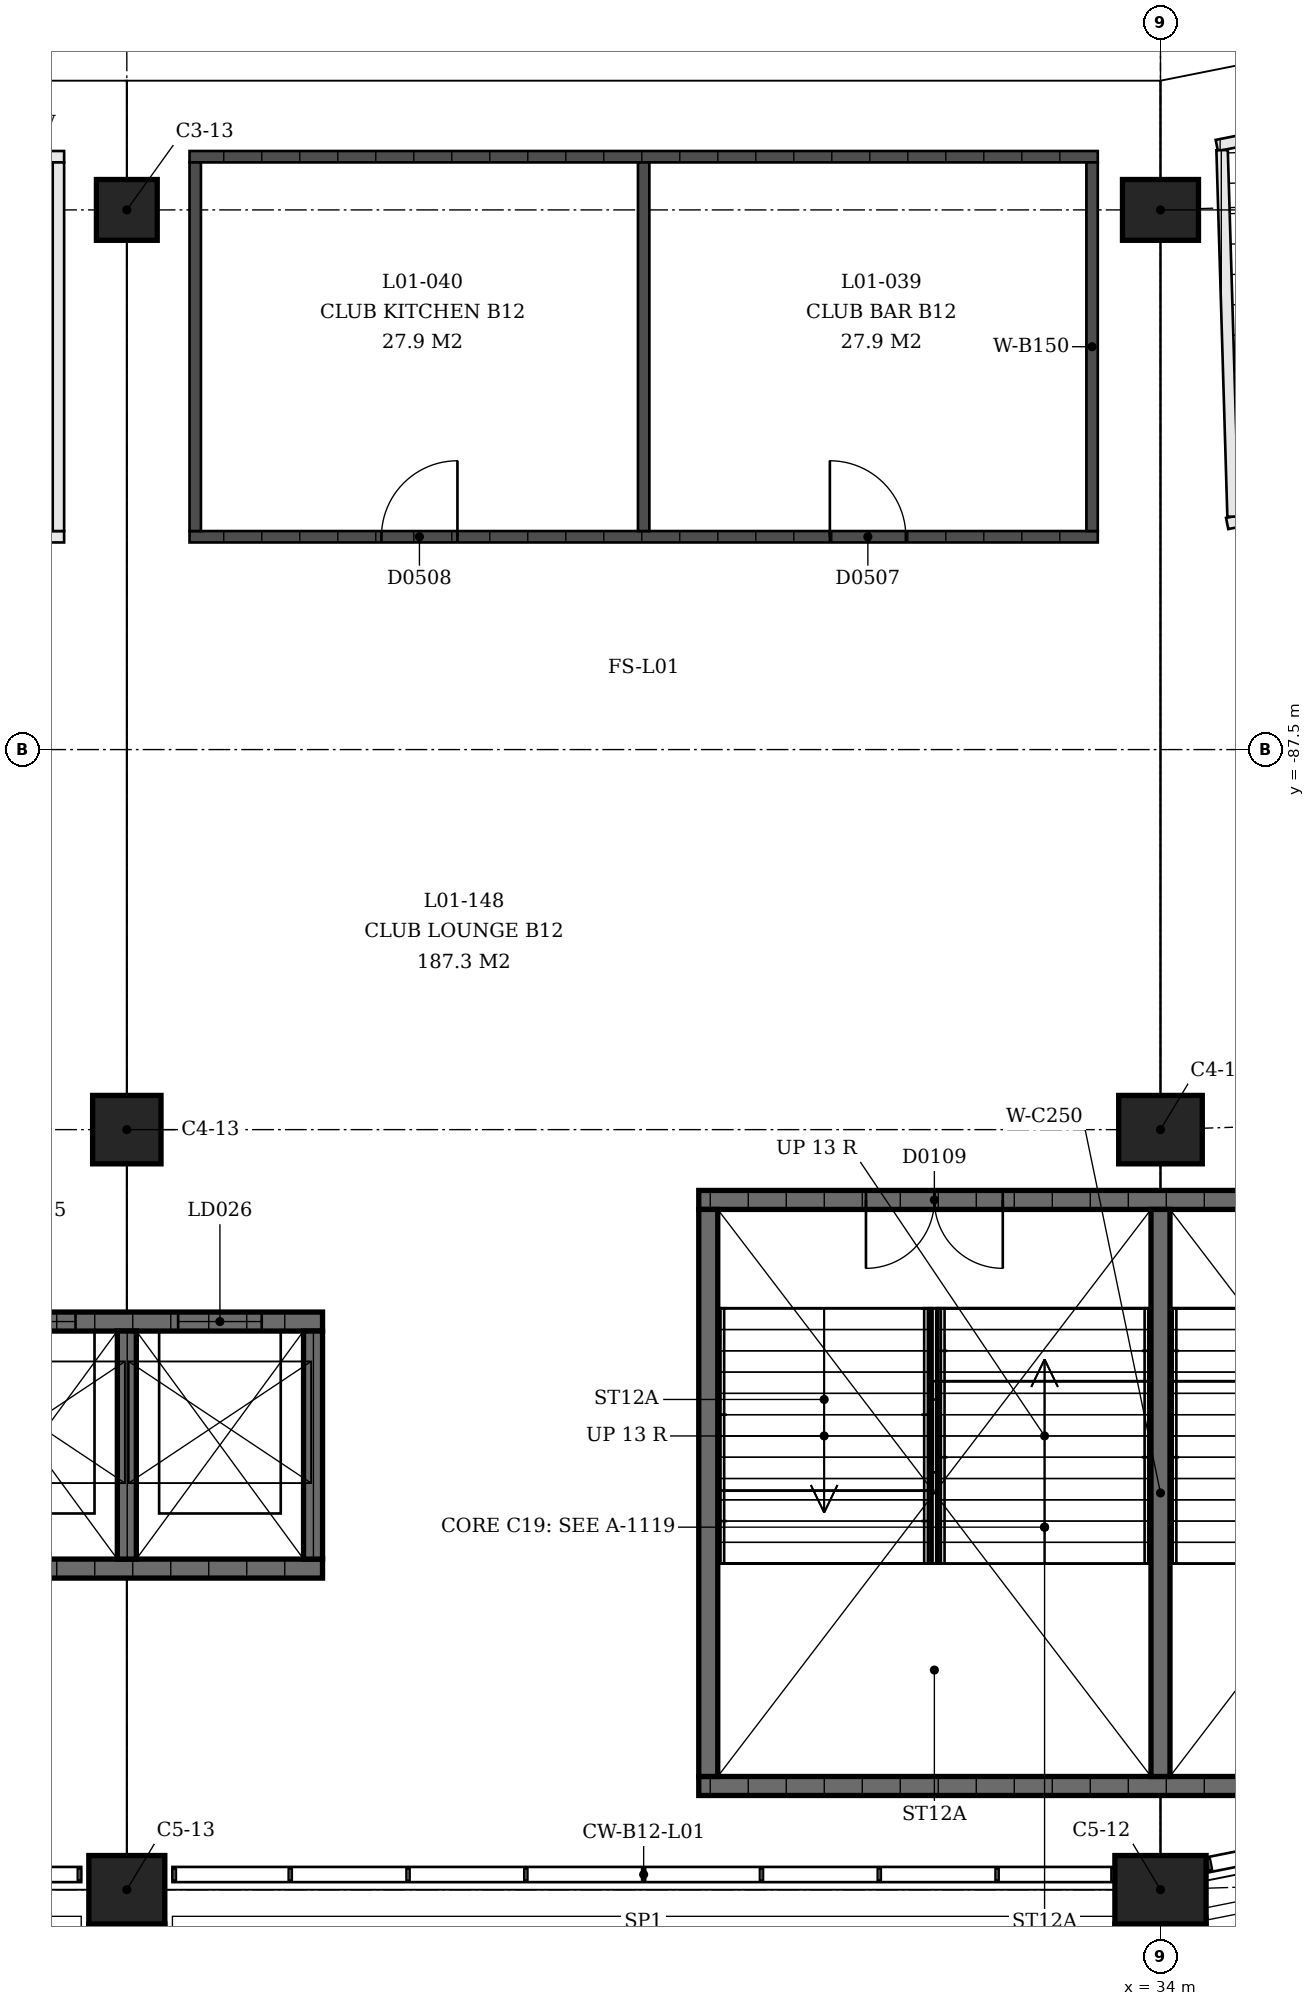
"""IFC4 building model, lengths in metres.
Left out: names, types, materials, properties, quantities, classifications, styles, units other than length and angle.
Written with IfcOpenShell. Run it as: python <this file> out.ifc"""

import sys

from ifc_helpers import new_model, si_unit, direction, frame, frame_2d, origin, origin_2d, place, context, subcontext, project, spatial, rectangle, extrude, element, fill, save


model = new_model("IFC4")
c1 = context("Model", 3, precision=1e-05, world=origin(), true_north=direction((0.0, 1.0)))
c2 = subcontext(c1, "Body", "Model", "MODEL_VIEW")
j1 = project(units=[si_unit("LENGTHUNIT", "METRE"), si_unit("PLANEANGLEUNIT", "RADIAN")], contexts=[c1])
p1 = place(None, origin())
s1 = spatial("IfcSite", under=j1, at=p1, CompositionType="ELEMENT")
p2 = place(p1, origin())
s2 = spatial("IfcBuilding", under=s1, at=p2, CompositionType="ELEMENT")
p3 = place(p2, frame((0.0, 0.0, 4.5)))
s3 = spatial("IfcBuildingStorey", under=s2, at=p3, CompositionType="ELEMENT", Elevation=4.5)
p4 = place(p3, frame((34.0, -80.4, 0.0), z_axis=(0.0, 0.0, 1.0), x_axis=(1.0, 0.0, 0.0)))
e1 = element("IfcColumn", 1, at=p4, inside=s3, PredefinedType="COLUMN", context=c2, shape_type="SweptSolid", body=[
    extrude(rectangle(XDim=1.0, YDim=0.8, at=origin_2d()), origin(), (0.0, 0.0, 1.0), 4.5),
])
p5 = place(p3, frame((34.0, -92.5, 0.0), z_axis=(0.0, 0.0, 1.0), x_axis=(1.0, 0.0, 0.0)))
e2 = element("IfcColumn", 2, at=p5, inside=s3, PredefinedType="COLUMN", context=c2, shape_type="SweptSolid", body=[
    extrude(rectangle(XDim=1.1, YDim=0.9, at=origin_2d()), origin(), (0.0, 0.0, 1.0), 4.5),
])
p6 = place(p3, frame((34.0, -102.5, 0.0), z_axis=(0.0, 0.0, 1.0), x_axis=(1.0, 0.0, 0.0)))
e3 = element("IfcColumn", 3, at=p6, inside=s3, PredefinedType="COLUMN", context=c2, shape_type="SweptSolid", body=[
    extrude(rectangle(XDim=1.2, YDim=0.9, at=origin_2d()), origin(), (0.0, 0.0, 1.0), 4.5),
])
p7 = place(p3, frame((20.4, -80.4, 0.0), z_axis=(0.0, 0.0, 1.0), x_axis=(1.0, 0.0, 0.0)))
e4 = element("IfcColumn", 4, at=p7, inside=s3, PredefinedType="COLUMN", context=c2, shape_type="SweptSolid", body=[
    extrude(rectangle(XDim=0.8, YDim=0.8, at=origin_2d()), origin(), (0.0, 0.0, 1.0), 4.5),
])
p8 = place(p3, frame((20.4, -92.5, 0.0), z_axis=(0.0, 0.0, 1.0), x_axis=(1.0, 0.0, 0.0)))
e5 = element("IfcColumn", 5, at=p8, inside=s3, PredefinedType="COLUMN", context=c2, shape_type="SweptSolid", body=[
    extrude(rectangle(XDim=0.9, YDim=0.9, at=origin_2d()), origin(), (0.0, 0.0, 1.0), 4.5),
])
p9 = place(p3, frame((20.4, -102.5, 0.0), z_axis=(0.0, 0.0, 1.0), x_axis=(1.0, 0.0, 0.0)))
e6 = element("IfcColumn", 6, at=p9, inside=s3, PredefinedType="COLUMN", context=c2, shape_type="SweptSolid", body=[
    extrude(rectangle(XDim=1.0, YDim=0.9, at=origin_2d()), origin(), (0.0, 0.0, 1.0), 4.5),
])
p10 = place(p3, frame((27.925, -93.425, 0.0), z_axis=(0.0, 0.0, 1.0), x_axis=(1.0, 0.0, 0.0)))
e7 = element("IfcWall", 7, at=p10, inside=s3, PredefinedType="SHEAR", context=c2, shape_type="SweptSolid", body=[
    extrude(rectangle(XDim=12.15, YDim=0.25, at=frame_2d((6.075, 0.0))), origin(), (0.0, 0.0, 1.0), 4.09),
])
p11 = place(p10, frame((2.2, 0.0, 0.0)))
e8 = element("IfcOpeningElement", 8, at=p11, cuts=e7, PredefinedType="OPENING", context=c2, shape_type="SweptSolid", body=[
    extrude(rectangle(XDim=1.8, YDim=2.1, at=frame_2d((0.9, 1.05))), frame((0.0, 0.125, 0.0), z_axis=(0.0, -1.0, 0.0), x_axis=(1.0, 0.0, 0.0)), (0.0, 0.0, 1.0), 0.25),
])
p12 = place(p10, frame((8.15, 0.0, 0.0)))
e9 = element("IfcOpeningElement", 9, at=p12, cuts=e7, PredefinedType="OPENING", context=c2, shape_type="SweptSolid", body=[
    extrude(rectangle(XDim=1.8, YDim=2.1, at=frame_2d((0.9, 1.05))), frame((0.0, 0.125, 0.0), z_axis=(0.0, -1.0, 0.0), x_axis=(1.0, 0.0, 0.0)), (0.0, 0.0, 1.0), 0.25),
])
p13 = place(p3, frame((27.925, -101.135, 0.0), z_axis=(0.0, 0.0, 1.0), x_axis=(1.0, 0.0, 0.0)))
e10 = element("IfcWall", 10, at=p13, inside=s3, PredefinedType="SHEAR", context=c2, shape_type="SweptSolid", body=[
    extrude(rectangle(XDim=12.15, YDim=0.25, at=frame_2d((6.075, 0.0))), origin(), (0.0, 0.0, 1.0), 4.09),
])
for number, where, z_axis, x_axis in (
    (11, (28.05, -93.55, 0.0), (0.0, 0.0, 1.0), (0.0, -1.0, 0.0)),
    (12, (34.0, -93.55, 0.0), (0.0, 0.0, 1.0), (0.0, -1.0, 0.0)),
):
    element("IfcWall", number, at=place(p3, frame(where, z_axis=z_axis, x_axis=x_axis)), inside=s3, PredefinedType="SHEAR", context=c2, shape_type="SweptSolid", body=[
        extrude(rectangle(XDim=7.46, YDim=0.25, at=frame_2d((3.73, 0.0))), origin(), (0.0, 0.0, 1.0), 4.09),
    ])
p14 = place(p3, frame((17.825, -95.025, 0.0), z_axis=(0.0, 0.0, 1.0), x_axis=(1.0, 0.0, 0.0)))
e13 = element("IfcWall", 13, at=p14, inside=s3, PredefinedType="SHEAR", context=c2, shape_type="SweptSolid", body=[
    extrude(rectangle(XDim=5.15, YDim=0.25, at=frame_2d((2.575, 0.0))), origin(), (0.0, 0.0, 1.0), 4.09),
])
p15 = place(p14, frame((0.8, 0.0, 0.0)))
e14 = element("IfcOpeningElement", 14, at=p15, cuts=e13, PredefinedType="OPENING", context=c2, shape_type="SweptSolid", body=[
    extrude(rectangle(XDim=1.1, YDim=2.1, at=frame_2d((0.55, 1.05))), frame((0.0, 0.125, 0.0), z_axis=(0.0, -1.0, 0.0), x_axis=(1.0, 0.0, 0.0)), (0.0, 0.0, 1.0), 0.25),
])
p16 = place(p14, frame((3.25, 0.0, 0.0)))
e15 = element("IfcOpeningElement", 15, at=p16, cuts=e13, PredefinedType="OPENING", context=c2, shape_type="SweptSolid", body=[
    extrude(rectangle(XDim=1.1, YDim=2.1, at=frame_2d((0.55, 1.05))), frame((0.0, 0.125, 0.0), z_axis=(0.0, -1.0, 0.0), x_axis=(1.0, 0.0, 0.0)), (0.0, 0.0, 1.0), 0.25),
])
p17 = place(p3, frame((17.825, -98.275, 0.0), z_axis=(0.0, 0.0, 1.0), x_axis=(1.0, 0.0, 0.0)))
e16 = element("IfcWall", 16, at=p17, inside=s3, PredefinedType="SHEAR", context=c2, shape_type="SweptSolid", body=[
    extrude(rectangle(XDim=5.15, YDim=0.25, at=frame_2d((2.575, 0.0))), origin(), (0.0, 0.0, 1.0), 4.09),
])
for number, where, z_axis, x_axis in (
    (17, (22.85, -95.15, 0.0), (0.0, 0.0, 1.0), (0.0, -1.0, 0.0)),
    (18, (20.4, -95.15, 0.0), (0.0, 0.0, 1.0), (0.0, -1.0, 0.0)),
):
    element("IfcWall", number, at=place(p3, frame(where, z_axis=z_axis, x_axis=x_axis)), inside=s3, PredefinedType="SHEAR", context=c2, shape_type="SweptSolid", body=[
        extrude(rectangle(XDim=3.0, YDim=0.25, at=frame_2d((1.5, 0.0))), origin(), (0.0, 0.0, 1.0), 4.09),
    ])
p18 = place(p3, frame((34.741, -79.552, 0.0), z_axis=(0.0, 0.0, 1.0), x_axis=(0.980786464492, 0.195084369103, 0.0)))
e19 = element("IfcWall", 19, at=p18, inside=s3, PredefinedType="PARTITIONING", context=c2, shape_type="SweptSolid", body=[
    extrude(rectangle(XDim=9.102, YDim=0.15, at=frame_2d((4.551, 0.0))), origin(), (0.0, 0.0, 1.0), 3.0),
])
p19 = place(p3, frame((34.877, -84.525, 0.0), z_axis=(0.0, 0.0, 1.0), x_axis=(0.98078580384, 0.195087690502, 0.0)))
e20 = element("IfcWall", 20, at=p19, inside=s3, PredefinedType="PARTITIONING", context=c2, shape_type="SweptSolid", body=[
    extrude(rectangle(XDim=10.775, YDim=0.15, at=frame_2d((5.387, 0.0))), origin(), (0.0, 0.0, 1.0), 3.0),
])
p20 = place(p19, frame((1.276, 0.0, 0.0)))
e21 = element("IfcOpeningElement", 21, at=p20, cuts=e20, PredefinedType="OPENING", context=c2, shape_type="SweptSolid", body=[
    extrude(rectangle(XDim=0.9, YDim=2.1, at=frame_2d((0.45, 1.05))), frame((0.0, 0.075, 0.0), z_axis=(0.0, -1.0, 0.0), x_axis=(1.0, 0.0, 0.0)), (0.0, 0.0, 1.0), 0.15),
])
p21 = place(p19, frame((4.566, 0.0, 0.0)))
e22 = element("IfcOpeningElement", 22, at=p21, cuts=e20, PredefinedType="OPENING", context=c2, shape_type="SweptSolid", body=[
    extrude(rectangle(XDim=0.9, YDim=2.1, at=frame_2d((0.45, 1.05))), frame((0.0, 0.075, 0.0), z_axis=(0.0, -1.0, 0.0), x_axis=(1.0, 0.0, 0.0)), (0.0, 0.0, 1.0), 0.15),
])
p22 = place(p19, frame((7.119, 0.0, 0.0)))
e23 = element("IfcOpeningElement", 23, at=p22, cuts=e20, PredefinedType="OPENING", context=c2, shape_type="SweptSolid", body=[
    extrude(rectangle(XDim=1.1, YDim=2.1, at=frame_2d((0.55, 1.05))), frame((0.0, 0.075, 0.0), z_axis=(0.0, -1.0, 0.0), x_axis=(1.0, 0.0, 0.0)), (0.0, 0.0, 1.0), 0.15),
])
p23 = place(p19, frame((9.135, 0.0, 0.0)))
e24 = element("IfcOpeningElement", 24, at=p23, cuts=e20, PredefinedType="OPENING", context=c2, shape_type="SweptSolid", body=[
    extrude(rectangle(XDim=1.1, YDim=2.1, at=frame_2d((0.55, 1.05))), frame((0.0, 0.075, 0.0), z_axis=(0.0, -1.0, 0.0), x_axis=(1.0, 0.0, 0.0)), (0.0, 0.0, 1.0), 0.15),
])
p24 = place(p3, frame((34.811, -79.614, 0.0), z_axis=(0.0, 0.0, 1.0), x_axis=(0.02991368842, -0.999552485488, 0.0)))
e25 = element("IfcWall", 25, at=p24, inside=s3, PredefinedType="PARTITIONING", context=c2, shape_type="SweptSolid", body=[
    extrude(rectangle(XDim=4.823, YDim=0.15, at=frame_2d((2.412, 0.0))), origin(), (0.0, 0.0, 1.0), 3.0),
])
p25 = place(p3, frame((33.175, -79.7, 0.0), z_axis=(0.0, 0.0, 1.0), x_axis=(-1.0, 0.0, 0.0)))
e26 = element("IfcWall", 26, at=p25, inside=s3, PredefinedType="SOLIDWALL", context=c2, shape_type="SweptSolid", body=[
    extrude(rectangle(XDim=11.95, YDim=0.15, at=frame_2d((5.975, 0.0))), origin(), (0.0, 0.0, 1.0), 3.0),
])
p26 = place(p3, frame((33.175, -84.7, 0.0), z_axis=(0.0, 0.0, 1.0), x_axis=(-1.0, 0.0, 0.0)))
e27 = element("IfcWall", 27, at=p26, inside=s3, PredefinedType="SOLIDWALL", context=c2, shape_type="SweptSolid", body=[
    extrude(rectangle(XDim=11.95, YDim=0.15, at=frame_2d((5.975, 0.0))), origin(), (0.0, 0.0, 1.0), 3.0),
])
p27 = place(p26, frame((2.525, 0.0, 0.0)))
e28 = element("IfcOpeningElement", 28, at=p27, cuts=e27, PredefinedType="OPENING", context=c2, shape_type="SweptSolid", body=[
    extrude(rectangle(XDim=1.0, YDim=2.1, at=frame_2d((0.5, 1.05))), frame((0.0, 0.075, 0.0), z_axis=(0.0, -1.0, 0.0), x_axis=(1.0, 0.0, 0.0)), (0.0, 0.0, 1.0), 0.15),
])
p28 = place(p26, frame((8.425, 0.0, 0.0)))
e29 = element("IfcOpeningElement", 29, at=p28, cuts=e27, PredefinedType="OPENING", context=c2, shape_type="SweptSolid", body=[
    extrude(rectangle(XDim=1.0, YDim=2.1, at=frame_2d((0.5, 1.05))), frame((0.0, 0.075, 0.0), z_axis=(0.0, -1.0, 0.0), x_axis=(1.0, 0.0, 0.0)), (0.0, 0.0, 1.0), 0.15),
])
for number, where, z_axis, x_axis in (
    (30, (33.1, -79.775, 0.0), (0.0, 0.0, 1.0), (0.0, -1.0, 0.0)),
    (31, (27.2, -79.775, 0.0), (0.0, 0.0, 1.0), (0.0, -1.0, 0.0)),
    (32, (21.3, -79.775, 0.0), (0.0, 0.0, 1.0), (0.0, -1.0, 0.0)),
):
    element("IfcWall", number, at=place(p3, frame(where, z_axis=z_axis, x_axis=x_axis)), inside=s3, PredefinedType="SOLIDWALL", context=c2, shape_type="SweptSolid", body=[
        extrude(rectangle(XDim=4.85, YDim=0.15, at=frame_2d((2.425, 0.0))), origin(), (0.0, 0.0, 1.0), 3.0),
    ])
p29 = place(p3, frame((7.625, -79.7, 0.0), z_axis=(0.0, 0.0, 1.0), x_axis=(1.0, 0.0, 0.0)))
e33 = element("IfcWall", 33, at=p29, inside=s3, PredefinedType="PARTITIONING", context=c2, shape_type="SweptSolid", body=[
    extrude(rectangle(XDim=11.95, YDim=0.15, at=frame_2d((5.975, 0.0))), origin(), (0.0, 0.0, 1.0), 3.0),
])
p30 = place(p3, frame((7.625, -84.7, 0.0), z_axis=(0.0, 0.0, 1.0), x_axis=(1.0, 0.0, 0.0)))
e34 = element("IfcWall", 34, at=p30, inside=s3, PredefinedType="PARTITIONING", context=c2, shape_type="SweptSolid", body=[
    extrude(rectangle(XDim=11.95, YDim=0.15, at=frame_2d((5.975, 0.0))), origin(), (0.0, 0.0, 1.0), 3.0),
])
p31 = place(p30, frame((1.454, 0.0, 0.0)))
e35 = element("IfcOpeningElement", 35, at=p31, cuts=e34, PredefinedType="OPENING", context=c2, shape_type="SweptSolid", body=[
    extrude(rectangle(XDim=0.9, YDim=2.1, at=frame_2d((0.45, 1.05))), frame((0.0, 0.075, 0.0), z_axis=(0.0, -1.0, 0.0), x_axis=(1.0, 0.0, 0.0)), (0.0, 0.0, 1.0), 0.15),
])
p32 = place(p30, frame((5.112, 0.0, 0.0)))
e36 = element("IfcOpeningElement", 36, at=p32, cuts=e34, PredefinedType="OPENING", context=c2, shape_type="SweptSolid", body=[
    extrude(rectangle(XDim=0.9, YDim=2.1, at=frame_2d((0.45, 1.05))), frame((0.0, 0.075, 0.0), z_axis=(0.0, -1.0, 0.0), x_axis=(1.0, 0.0, 0.0)), (0.0, 0.0, 1.0), 0.15),
])
p33 = place(p30, frame((7.962, 0.0, 0.0)))
e37 = element("IfcOpeningElement", 37, at=p33, cuts=e34, PredefinedType="OPENING", context=c2, shape_type="SweptSolid", body=[
    extrude(rectangle(XDim=1.1, YDim=2.1, at=frame_2d((0.55, 1.05))), frame((0.0, 0.075, 0.0), z_axis=(0.0, -1.0, 0.0), x_axis=(1.0, 0.0, 0.0)), (0.0, 0.0, 1.0), 0.15),
])
p34 = place(p30, frame((10.204, 0.0, 0.0)))
e38 = element("IfcOpeningElement", 38, at=p34, cuts=e34, PredefinedType="OPENING", context=c2, shape_type="SweptSolid", body=[
    extrude(rectangle(XDim=1.1, YDim=2.1, at=frame_2d((0.55, 1.05))), frame((0.0, 0.075, 0.0), z_axis=(0.0, -1.0, 0.0), x_axis=(1.0, 0.0, 0.0)), (0.0, 0.0, 1.0), 0.15),
])
p35 = place(p3, frame((19.5, -79.775, 0.0), z_axis=(0.0, 0.0, 1.0), x_axis=(0.0, -1.0, 0.0)))
e39 = element("IfcWall", 39, at=p35, inside=s3, PredefinedType="PARTITIONING", context=c2, shape_type="SweptSolid", body=[
    extrude(rectangle(XDim=4.85, YDim=0.15, at=frame_2d((2.425, 0.0))), origin(), (0.0, 0.0, 1.0), 3.0),
])
p36 = place(p11, origin())
e40 = element("IfcDoor", 40, at=p36, inside=s3, OperationType="DOUBLE_DOOR_SINGLE_SWING", PredefinedType="DOOR", context=c2, shape_type="SweptSolid", body=[
    extrude(rectangle(XDim=1.8, YDim=2.1, at=frame_2d((0.9, 1.05))), frame((0.0, 0.025, 0.0), z_axis=(0.0, -1.0, 0.0), x_axis=(1.0, 0.0, 0.0)), (0.0, 0.0, 1.0), 0.05),
])
fill(e8, e40)
p37 = place(p15, origin())
e41 = element("IfcDoor", 41, at=p37, inside=s3, OperationType="SLIDING_TO_LEFT", PredefinedType="DOOR", context=c2, shape_type="SweptSolid", body=[
    extrude(rectangle(XDim=1.1, YDim=2.1, at=frame_2d((0.55, 1.05))), frame((0.0, 0.025, 0.0), z_axis=(0.0, -1.0, 0.0), x_axis=(1.0, 0.0, 0.0)), (0.0, 0.0, 1.0), 0.05),
])
fill(e14, e41)
p38 = place(p16, origin())
e42 = element("IfcDoor", 42, at=p38, inside=s3, OperationType="SLIDING_TO_LEFT", PredefinedType="DOOR", context=c2, shape_type="SweptSolid", body=[
    extrude(rectangle(XDim=1.1, YDim=2.1, at=frame_2d((0.55, 1.05))), frame((0.0, 0.025, 0.0), z_axis=(0.0, -1.0, 0.0), x_axis=(1.0, 0.0, 0.0)), (0.0, 0.0, 1.0), 0.05),
])
fill(e15, e42)
p39 = place(p27, origin())
e43 = element("IfcDoor", 43, at=p39, inside=s3, OperationType="SINGLE_SWING_RIGHT", PredefinedType="DOOR", context=c2, shape_type="SweptSolid", body=[
    extrude(rectangle(XDim=1.0, YDim=2.1, at=frame_2d((0.5, 1.05))), frame((0.0, 0.025, 0.0), z_axis=(0.0, -1.0, 0.0), x_axis=(1.0, 0.0, 0.0)), (0.0, 0.0, 1.0), 0.05),
])
fill(e28, e43)
p40 = place(p28, origin())
e44 = element("IfcDoor", 44, at=p40, inside=s3, OperationType="SINGLE_SWING_LEFT", PredefinedType="DOOR", context=c2, shape_type="SweptSolid", body=[
    extrude(rectangle(XDim=1.0, YDim=2.1, at=frame_2d((0.5, 1.05))), frame((0.0, 0.025, 0.0), z_axis=(0.0, -1.0, 0.0), x_axis=(1.0, 0.0, 0.0)), (0.0, 0.0, 1.0), 0.05),
])
fill(e29, e44)
save(model, sys.argv[1])
